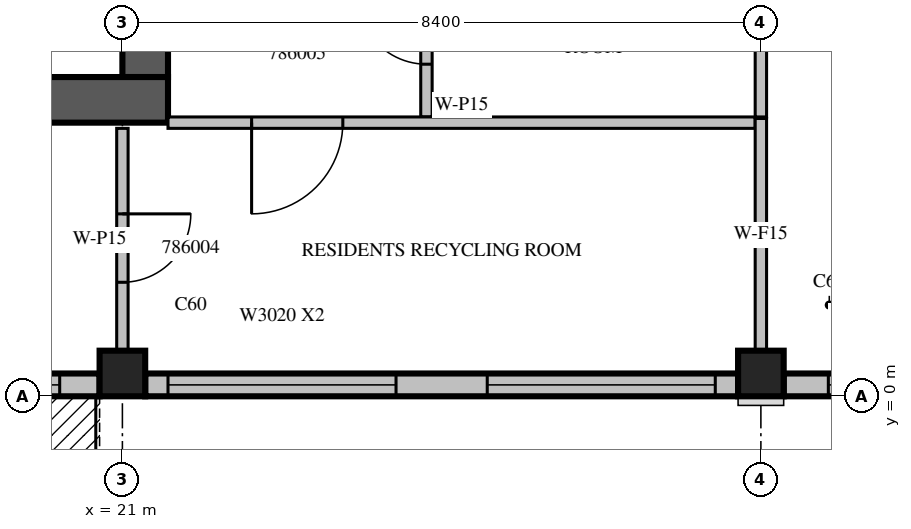
"""IFC4 building model, lengths in metres.
Left out: names, types, materials, properties, quantities, classifications, styles, units other than length and angle.
Written with IfcOpenShell. Run it as: python <this file> out.ifc"""

import sys

from ifc_helpers import new_model, si_unit, direction, frame, frame_2d, origin, origin_2d, place, context, subcontext, project, spatial, rectangle, extrude, source, transform, mapped, element, fill, save


model = new_model("IFC4")
c1 = context("Model", 3, precision=1e-05, world=origin(), true_north=direction((0.0, 1.0)))
c2 = subcontext(c1, "Body", "Model", "MODEL_VIEW")
j1 = project(units=[si_unit("LENGTHUNIT", "METRE"), si_unit("PLANEANGLEUNIT", "RADIAN")], contexts=[c1])
p1 = place(None, origin())
s1 = spatial("IfcSite", under=j1, at=p1, CompositionType="ELEMENT")
p2 = place(p1, origin())
s2 = spatial("IfcBuilding", under=s1, at=p2, CompositionType="ELEMENT")
p3 = place(p2, frame((0.0, 0.0, 361.5)))
s3 = spatial("IfcBuildingStorey", under=s2, at=p3, CompositionType="ELEMENT", Elevation=361.5)
m1 = source(origin(), c2, "Body", "SweptSolid", [
    extrude(rectangle(XDim=0.6, YDim=0.6, at=origin_2d()), origin(), (0.0, 0.0, 1.0), 3.5),
])
for number, where, z_axis, x_axis in (
    (1, (21.0, 0.3, 0.0), (0.0, 0.0, 1.0), (1.0, 0.0, 0.0)),
    (2, (29.4, 0.3, 0.0), (0.0, 0.0, 1.0), (1.0, 0.0, 0.0)),
):
    element("IfcColumn", number, at=place(p3, frame(where, z_axis=z_axis, x_axis=x_axis)), inside=s3, PredefinedType="COLUMN", context=c2, shape_type="MappedRepresentation", body=[
        mapped(m1, transform((0.0, 0.0, 0.0), scale=1.0)),
    ])
m2 = source(origin(), c2, "Body", "SweptSolid", [
    extrude(rectangle(XDim=6.3, YDim=0.6, at=frame_2d((3.15, 0.0))), origin(), (0.0, 0.0, 1.0), 3.5),
])
p4 = place(p3, frame((21.3, 4.2, 0.0), z_axis=(0.0, 0.0, 1.0), x_axis=(0.0, 1.0, 0.0)))
e3 = element("IfcWall", 3, at=p4, inside=s3, PredefinedType="SHEAR", context=c2, shape_type="MappedRepresentation", body=[
    mapped(m2, transform((0.0, 0.0, 0.0), scale=1.0)),
])
m3 = source(origin(), c2, "Body", "SweptSolid", [
    extrude(rectangle(XDim=2.2, YDim=2.1, at=frame_2d((1.1, 1.05))), frame((0.0, 0.31, 0.0), z_axis=(0.0, -1.0, 0.0), x_axis=(1.0, 0.0, 0.0)), (0.0, 0.0, 1.0), 0.62),
])
p5 = place(p4, frame((4.0, 0.0, 0.0)))
e4 = element("IfcOpeningElement", 4, at=p5, cuts=e3, PredefinedType="OPENING", context=c2, shape_type="MappedRepresentation", body=[
    mapped(m3, transform((0.0, 0.0, 0.0), scale=1.0)),
])
m4 = source(origin(), c2, "Body", "SweptSolid", [
    extrude(rectangle(XDim=17.4, YDim=0.6, at=frame_2d((8.7, 0.0))), origin(), (0.0, 0.0, 1.0), 3.5),
])
p6 = place(p3, frame((4.2, 3.9, 0.0), z_axis=(0.0, 0.0, 1.0), x_axis=(1.0, 0.0, 0.0)))
e5 = element("IfcWall", 5, at=p6, inside=s3, PredefinedType="SHEAR", context=c2, shape_type="MappedRepresentation", body=[
    mapped(m4, transform((0.0, 0.0, 0.0), scale=1.0)),
])
m5 = source(origin(), c2, "Body", "SweptSolid", [
    extrude(rectangle(XDim=0.9, YDim=2.1, at=frame_2d((0.45, 1.05))), frame((0.0, 0.31, 0.0), z_axis=(0.0, -1.0, 0.0), x_axis=(1.0, 0.0, 0.0)), (0.0, 0.0, 1.0), 0.62),
])
p7 = place(p6, frame((14.0, 0.0, 0.0)))
e6 = element("IfcOpeningElement", 6, at=p7, cuts=e5, PredefinedType="OPENING", context=c2, shape_type="MappedRepresentation", body=[
    mapped(m5, transform((0.0, 0.0, 0.0), scale=1.0)),
])
m6 = source(origin(), c2, "Body", "SweptSolid", [
    extrude(rectangle(XDim=9.9, YDim=0.3, at=frame_2d((4.95, 0.0))), origin(), (0.0, 0.0, 1.0), 3.1),
])
p8 = place(p3, frame((10.8, 0.15, 0.0), z_axis=(0.0, 0.0, 1.0), x_axis=(1.0, 0.0, 0.0)))
e7 = element("IfcWall", 7, at=p8, inside=s3, PredefinedType="STANDARD", context=c2, shape_type="MappedRepresentation", body=[
    mapped(m6, transform((0.0, 0.0, 0.0), scale=1.0)),
])
m7 = source(origin(), c2, "Body", "SweptSolid", [
    extrude(rectangle(XDim=1.8, YDim=2.4, at=frame_2d((0.9, 1.2))), frame((0.0, 0.16, 0.0), z_axis=(0.0, -1.0, 0.0), x_axis=(1.0, 0.0, 0.0)), (0.0, 0.0, 1.0), 0.32),
])
p9 = place(p8, frame((2.025, 0.0, 0.0)))
e8 = element("IfcOpeningElement", 8, at=p9, cuts=e7, PredefinedType="OPENING", context=c2, shape_type="MappedRepresentation", body=[
    mapped(m7, transform((0.0, 0.0, 0.0), scale=1.0)),
])
m8 = source(origin(), c2, "Body", "SweptSolid", [
    extrude(rectangle(XDim=3.6, YDim=2.0, at=frame_2d((1.8, 1.0))), frame((0.0, 0.16, 0.0), z_axis=(0.0, -1.0, 0.0), x_axis=(1.0, 0.0, 0.0)), (0.0, 0.0, 1.0), 0.32),
])
p10 = place(p8, frame((5.775, 0.0, 0.6)))
e9 = element("IfcOpeningElement", 9, at=p10, cuts=e7, PredefinedType="OPENING", context=c2, shape_type="MappedRepresentation", body=[
    mapped(m8, transform((0.0, 0.0, 0.0), scale=1.0)),
])
m9 = source(origin(), c2, "Body", "SweptSolid", [
    extrude(rectangle(XDim=7.8, YDim=0.3, at=frame_2d((3.9, 0.0))), origin(), (0.0, 0.0, 1.0), 3.1),
])
p11 = place(p3, frame((21.3, 0.15, 0.0), z_axis=(0.0, 0.0, 1.0), x_axis=(1.0, 0.0, 0.0)))
e10 = element("IfcWall", 10, at=p11, inside=s3, PredefinedType="STANDARD", context=c2, shape_type="MappedRepresentation", body=[
    mapped(m9, transform((0.0, 0.0, 0.0), scale=1.0)),
])
m10 = source(origin(), c2, "Body", "SweptSolid", [
    extrude(rectangle(XDim=3.0, YDim=2.0, at=frame_2d((1.5, 1.0))), frame((0.0, 0.16, 0.0), z_axis=(0.0, -1.0, 0.0), x_axis=(1.0, 0.0, 0.0)), (0.0, 0.0, 1.0), 0.32),
])
p12 = place(p11, frame((0.3, 0.0, 0.6)))
e11 = element("IfcOpeningElement", 11, at=p12, cuts=e10, PredefinedType="OPENING", context=c2, shape_type="MappedRepresentation", body=[
    mapped(m10, transform((0.0, 0.0, 0.0), scale=1.0)),
])
p13 = place(p11, frame((4.5, 0.0, 0.6)))
e12 = element("IfcOpeningElement", 12, at=p13, cuts=e10, PredefinedType="OPENING", context=c2, shape_type="MappedRepresentation", body=[
    mapped(m10, transform((0.0, 0.0, 0.0), scale=1.0)),
])
p14 = place(p3, frame((29.7, 0.15, 0.0), z_axis=(0.0, 0.0, 1.0), x_axis=(1.0, 0.0, 0.0)))
e13 = element("IfcWall", 13, at=p14, inside=s3, PredefinedType="STANDARD", context=c2, shape_type="MappedRepresentation", body=[
    mapped(m9, transform((0.0, 0.0, 0.0), scale=1.0)),
])
m11 = source(origin(), c2, "Body", "SweptSolid", [
    extrude(rectangle(XDim=1.2, YDim=2.0, at=frame_2d((0.6, 1.0))), frame((0.0, 0.16, 0.0), z_axis=(0.0, -1.0, 0.0), x_axis=(1.0, 0.0, 0.0)), (0.0, 0.0, 1.0), 0.32),
])
p15 = place(p14, frame((0.588, 0.0, 0.6)))
e14 = element("IfcOpeningElement", 14, at=p15, cuts=e13, PredefinedType="OPENING", context=c2, shape_type="MappedRepresentation", body=[
    mapped(m11, transform((0.0, 0.0, 0.0), scale=1.0)),
])
p16 = place(p14, frame((6.112, 0.0, 0.6)))
e15 = element("IfcOpeningElement", 15, at=p16, cuts=e13, PredefinedType="OPENING", context=c2, shape_type="MappedRepresentation", body=[
    mapped(m11, transform((0.0, 0.0, 0.0), scale=1.0)),
])
m12 = source(origin(), c2, "Body", "SweptSolid", [
    extrude(rectangle(XDim=2.4, YDim=2.0, at=frame_2d((1.2, 1.0))), frame((0.0, 0.16, 0.0), z_axis=(0.0, -1.0, 0.0), x_axis=(1.0, 0.0, 0.0)), (0.0, 0.0, 1.0), 0.32),
])
p17 = place(p14, frame((2.75, 0.0, 0.6)))
e16 = element("IfcOpeningElement", 16, at=p17, cuts=e13, PredefinedType="OPENING", context=c2, shape_type="MappedRepresentation", body=[
    mapped(m12, transform((0.0, 0.0, 0.0), scale=1.0)),
])
m13 = source(origin(), c2, "Body", "SweptSolid", [
    extrude(rectangle(XDim=4.575, YDim=0.15, at=frame_2d((2.288, 0.0))), origin(), (0.0, 0.0, 1.0), 3.1),
])
p18 = place(p3, frame((25.0, 8.25, 0.0), z_axis=(0.0, 0.0, 1.0), x_axis=(0.0, -1.0, 0.0)))
e17 = element("IfcWall", 17, at=p18, inside=s3, PredefinedType="PARTITIONING", context=c2, shape_type="MappedRepresentation", body=[
    mapped(m13, transform((0.0, 0.0, 0.0), scale=1.0)),
])
m14 = source(origin(), c2, "Body", "SweptSolid", [
    extrude(rectangle(XDim=0.9, YDim=2.1, at=frame_2d((0.45, 1.05))), frame((0.0, 0.085, 0.0), z_axis=(0.0, -1.0, 0.0), x_axis=(1.0, 0.0, 0.0)), (0.0, 0.0, 1.0), 0.17),
])
p19 = place(p18, frame((2.981, 0.0, 0.0)))
e18 = element("IfcOpeningElement", 18, at=p19, cuts=e17, PredefinedType="OPENING", context=c2, shape_type="MappedRepresentation", body=[
    mapped(m14, transform((0.0, 0.0, 0.0), scale=1.0)),
])
p20 = place(p3, frame((29.4, 3.675, 0.0), z_axis=(0.0, 0.0, 1.0), x_axis=(0.0, 1.0, 0.0)))
e19 = element("IfcWall", 19, at=p20, inside=s3, PredefinedType="PARTITIONING", context=c2, shape_type="MappedRepresentation", body=[
    mapped(m13, transform((0.0, 0.0, 0.0), scale=1.0)),
])
m15 = source(origin(), c2, "Body", "SweptSolid", [
    extrude(rectangle(XDim=2.926, YDim=0.15, at=frame_2d((1.463, 0.0))), origin(), (0.0, 0.0, 1.0), 3.1),
])
p21 = place(p3, frame((21.0, 3.525, 0.0), z_axis=(0.0, 0.0, 1.0), x_axis=(0.0, -1.0, 0.0)))
e20 = element("IfcWall", 20, at=p21, inside=s3, PredefinedType="PARTITIONING", context=c2, shape_type="MappedRepresentation", body=[
    mapped(m15, transform((0.0, 0.0, 0.0), scale=1.0)),
])
p22 = place(p21, frame((1.125, 0.0, 0.0)))
e21 = element("IfcOpeningElement", 21, at=p22, cuts=e20, PredefinedType="OPENING", context=c2, shape_type="MappedRepresentation", body=[
    mapped(m14, transform((0.0, 0.0, 0.0), scale=1.0)),
])
m16 = source(origin(), c2, "Body", "SweptSolid", [
    extrude(rectangle(XDim=7.725, YDim=0.15, at=frame_2d((3.862, 0.0))), origin(), (0.0, 0.0, 1.0), 3.1),
])
p23 = place(p3, frame((21.6, 3.6, 0.0), z_axis=(0.0, 0.0, 1.0), x_axis=(1.0, 0.0, 0.0)))
e22 = element("IfcWall", 22, at=p23, inside=s3, PredefinedType="PARTITIONING", context=c2, shape_type="MappedRepresentation", body=[
    mapped(m16, transform((0.0, 0.0, 0.0), scale=1.0)),
])
m17 = source(origin(), c2, "Body", "SweptSolid", [
    extrude(rectangle(XDim=1.2, YDim=2.1, at=frame_2d((0.6, 1.05))), frame((0.0, 0.085, 0.0), z_axis=(0.0, -1.0, 0.0), x_axis=(1.0, 0.0, 0.0)), (0.0, 0.0, 1.0), 0.17),
])
p24 = place(p23, frame((1.1, 0.0, 0.0)))
e23 = element("IfcOpeningElement", 23, at=p24, cuts=e22, PredefinedType="OPENING", context=c2, shape_type="MappedRepresentation", body=[
    mapped(m17, transform((0.0, 0.0, 0.0), scale=1.0)),
])
m18 = source(origin(), c2, "Body", "SweptSolid", [
    extrude(rectangle(XDim=3.056, YDim=0.15, at=frame_2d((1.528, 0.0))), origin(), (0.0, 0.0, 1.0), 3.1),
])
p25 = place(p3, frame((29.4, 0.599, 0.0), z_axis=(0.0, 0.0, 1.0), x_axis=(0.0, 1.0, 0.0)))
e24 = element("IfcWall", 24, at=p25, inside=s3, PredefinedType="PARTITIONING", context=c2, shape_type="MappedRepresentation", body=[
    mapped(m18, transform((0.0, 0.0, 0.0), scale=1.0)),
])
m19 = source(origin(), c2, "Body", "SweptSolid", [
    extrude(rectangle(XDim=3.6, YDim=2.0, at=frame_2d((1.8, 1.0))), frame((0.0, 0.03, 0.0), z_axis=(0.0, -1.0, 0.0), x_axis=(1.0, 0.0, 0.0)), (0.0, 0.0, 1.0), 0.06),
])
p26 = place(p10, origin())
e25 = element("IfcWindow", 25, at=p26, inside=s3, PartitioningType="SINGLE_PANEL", PredefinedType="WINDOW", context=c2, shape_type="MappedRepresentation", body=[
    mapped(m19, transform((0.0, 0.0, 0.0), scale=1.0)),
])
fill(e9, e25)
m20 = source(origin(), c2, "Body", "SweptSolid", [
    extrude(rectangle(XDim=3.0, YDim=2.0, at=frame_2d((1.5, 1.0))), frame((0.0, 0.03, 0.0), z_axis=(0.0, -1.0, 0.0), x_axis=(1.0, 0.0, 0.0)), (0.0, 0.0, 1.0), 0.06),
])
p27 = place(p12, origin())
e26 = element("IfcWindow", 26, at=p27, inside=s3, PartitioningType="SINGLE_PANEL", PredefinedType="WINDOW", context=c2, shape_type="MappedRepresentation", body=[
    mapped(m20, transform((0.0, 0.0, 0.0), scale=1.0)),
])
fill(e11, e26)
p28 = place(p13, origin())
e27 = element("IfcWindow", 27, at=p28, inside=s3, PartitioningType="SINGLE_PANEL", PredefinedType="WINDOW", context=c2, shape_type="MappedRepresentation", body=[
    mapped(m20, transform((0.0, 0.0, 0.0), scale=1.0)),
])
fill(e12, e27)
m21 = source(origin(), c2, "Body", "SweptSolid", [
    extrude(rectangle(XDim=1.2, YDim=2.0, at=frame_2d((0.6, 1.0))), frame((0.0, 0.03, 0.0), z_axis=(0.0, -1.0, 0.0), x_axis=(1.0, 0.0, 0.0)), (0.0, 0.0, 1.0), 0.06),
])
p29 = place(p15, origin())
e28 = element("IfcWindow", 28, at=p29, inside=s3, PartitioningType="SINGLE_PANEL", PredefinedType="WINDOW", context=c2, shape_type="MappedRepresentation", body=[
    mapped(m21, transform((0.0, 0.0, 0.0), scale=1.0)),
])
fill(e14, e28)
m22 = source(origin(), c2, "Body", "SweptSolid", [
    extrude(rectangle(XDim=0.9, YDim=2.1, at=frame_2d((0.45, 1.05))), frame((0.0, 0.025, 0.0), z_axis=(0.0, -1.0, 0.0), x_axis=(1.0, 0.0, 0.0)), (0.0, 0.0, 1.0), 0.05),
])
p30 = place(p19, origin())
e29 = element("IfcDoor", 29, at=p30, inside=s3, OperationType="SINGLE_SWING_RIGHT", PredefinedType="DOOR", context=c2, shape_type="MappedRepresentation", body=[
    mapped(m22, transform((0.0, 0.0, 0.0), scale=1.0)),
])
fill(e18, e29)
p31 = place(p22, origin())
e30 = element("IfcDoor", 30, at=p31, inside=s3, OperationType="SINGLE_SWING_LEFT", PredefinedType="DOOR", context=c2, shape_type="MappedRepresentation", body=[
    mapped(m22, transform((0.0, 0.0, 0.0), scale=1.0)),
])
fill(e21, e30)
m23 = source(origin(), c2, "Body", "SweptSolid", [
    extrude(rectangle(XDim=1.2, YDim=2.1, at=frame_2d((0.6, 1.05))), frame((0.0, 0.025, 0.0), z_axis=(0.0, -1.0, 0.0), x_axis=(1.0, 0.0, 0.0)), (0.0, 0.0, 1.0), 0.05),
])
p32 = place(p24, origin())
e31 = element("IfcDoor", 31, at=p32, inside=s3, OperationType="SINGLE_SWING_RIGHT", PredefinedType="DOOR", context=c2, shape_type="MappedRepresentation", body=[
    mapped(m23, transform((0.0, 0.0, 0.0), scale=1.0)),
])
fill(e23, e31)
save(model, sys.argv[1])
